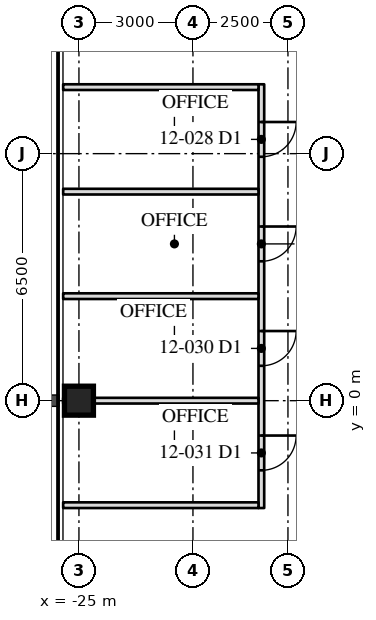
"""IFC4 building model, lengths in metres.
Left out: names, types, materials, properties, quantities, classifications, styles, units other than length and angle.
Written with IfcOpenShell. Run it as: python <this file> out.ifc"""

import sys

from ifc_helpers import new_model, si_unit, direction, frame, frame_2d, origin, origin_2d, place, context, subcontext, project, spatial, rectangle, hollow_rectangle, extrude, element, fill, save


model = new_model("IFC4")
c1 = context("Model", 3, precision=1e-05, world=origin(), true_north=direction((0.0, 1.0)))
c2 = subcontext(c1, "Body", "Model", "MODEL_VIEW")
j1 = project(units=[si_unit("LENGTHUNIT", "METRE"), si_unit("PLANEANGLEUNIT", "RADIAN")], contexts=[c1])
p1 = place(None, origin())
s1 = spatial("IfcSite", under=j1, at=p1, CompositionType="ELEMENT")
p2 = place(p1, origin())
s2 = spatial("IfcBuilding", under=s1, at=p2, CompositionType="ELEMENT")
p3 = place(p2, frame((0.0, 0.0, 52.9)))
s3 = spatial("IfcBuildingStorey", under=s2, at=p3, CompositionType="ELEMENT", Elevation=52.9)
p4 = place(p3, frame((-25.0, 0.0, 0.0), z_axis=(0.0, 0.0, 1.0), x_axis=(0.0, 1.0, 0.0)))
e1 = element("IfcColumn", 1, at=p4, inside=s3, PredefinedType="COLUMN", context=c2, shape_type="SweptSolid", body=[
    extrude(hollow_rectangle(XDim=0.762, YDim=0.762, WallThickness=0.127, at=origin_2d()), origin(), (0.0, 0.0, 1.0), 4.1),
])
p5 = place(p3, frame((-20.2, 8.325, 0.0), z_axis=(0.0, 0.0, 1.0), x_axis=(0.0, -1.0, 0.0)))
e2 = element("IfcWall", 2, at=p5, inside=s3, PredefinedType="PARTITIONING", context=c2, shape_type="SweptSolid", body=[
    extrude(rectangle(XDim=11.15, YDim=0.15, at=frame_2d((5.575, 0.0))), origin(), (0.0, 0.0, 1.0), 3.91),
])
p6 = place(p5, frame((0.992, 0.0, 0.0)))
e3 = element("IfcOpeningElement", 3, at=p6, cuts=e2, PredefinedType="OPENING", context=c2, shape_type="SweptSolid", body=[
    extrude(rectangle(XDim=0.915, YDim=2.134, at=frame_2d((0.458, 1.067))), frame((0.0, 0.085, 0.0), z_axis=(0.0, -1.0, 0.0), x_axis=(1.0, 0.0, 0.0)), (0.0, 0.0, 1.0), 0.17),
])
p7 = place(p5, frame((3.742, 0.0, 0.0)))
e4 = element("IfcOpeningElement", 4, at=p7, cuts=e2, PredefinedType="OPENING", context=c2, shape_type="SweptSolid", body=[
    extrude(rectangle(XDim=0.915, YDim=2.134, at=frame_2d((0.458, 1.067))), frame((0.0, 0.085, 0.0), z_axis=(0.0, -1.0, 0.0), x_axis=(1.0, 0.0, 0.0)), (0.0, 0.0, 1.0), 0.17),
])
p8 = place(p5, frame((6.492, 0.0, 0.0)))
e5 = element("IfcOpeningElement", 5, at=p8, cuts=e2, PredefinedType="OPENING", context=c2, shape_type="SweptSolid", body=[
    extrude(rectangle(XDim=0.915, YDim=2.134, at=frame_2d((0.458, 1.067))), frame((0.0, 0.085, 0.0), z_axis=(0.0, -1.0, 0.0), x_axis=(1.0, 0.0, 0.0)), (0.0, 0.0, 1.0), 0.17),
])
p9 = place(p5, frame((9.242, 0.0, 0.0)))
e6 = element("IfcOpeningElement", 6, at=p9, cuts=e2, PredefinedType="OPENING", context=c2, shape_type="SweptSolid", body=[
    extrude(rectangle(XDim=0.915, YDim=2.134, at=frame_2d((0.458, 1.067))), frame((0.0, 0.085, 0.0), z_axis=(0.0, -1.0, 0.0), x_axis=(1.0, 0.0, 0.0)), (0.0, 0.0, 1.0), 0.17),
])
for number, where, z_axis, x_axis in (
    (7, (-20.275, 8.25, 0.0), (0.0, 0.0, 1.0), (-1.0, 0.0, 0.0)),
    (8, (-20.275, 5.5, 0.0), (0.0, 0.0, 1.0), (-1.0, 0.0, 0.0)),
    (9, (-20.275, 2.75, 0.0), (0.0, 0.0, 1.0), (-1.0, 0.0, 0.0)),
):
    element("IfcWall", number, at=place(p3, frame(where, z_axis=z_axis, x_axis=x_axis)), inside=s3, PredefinedType="PARTITIONING", context=c2, shape_type="SweptSolid", body=[
        extrude(rectangle(XDim=5.14, YDim=0.15, at=frame_2d((2.57, 0.0))), origin(), (0.0, 0.0, 1.0), 3.91),
    ])
p10 = place(p3, frame((-20.275, 0.0, 0.0), z_axis=(0.0, 0.0, 1.0), x_axis=(-1.0, 0.0, 0.0)))
e10 = element("IfcWall", 10, at=p10, inside=s3, PredefinedType="PARTITIONING", context=c2, shape_type="SweptSolid", body=[
    extrude(rectangle(XDim=5.14, YDim=0.15, at=frame_2d((2.57, 0.0))), origin(), (0.0, 0.0, 1.0), 3.13),
])
p11 = place(p3, frame((-20.275, -2.75, 0.0), z_axis=(0.0, 0.0, 1.0), x_axis=(-1.0, 0.0, 0.0)))
e11 = element("IfcWall", 11, at=p11, inside=s3, PredefinedType="PARTITIONING", context=c2, shape_type="SweptSolid", body=[
    extrude(rectangle(XDim=5.14, YDim=0.15, at=frame_2d((2.57, 0.0))), origin(), (0.0, 0.0, 1.0), 3.91),
])
p12 = place(p6, origin())
e12 = element("IfcDoor", 12, at=p12, inside=s3, OperationType="SINGLE_SWING_LEFT", PredefinedType="DOOR", context=c2, shape_type="SweptSolid", body=[
    extrude(rectangle(XDim=0.915, YDim=2.134, at=frame_2d((0.458, 1.067))), frame((0.0, 0.025, 0.0), z_axis=(0.0, -1.0, 0.0), x_axis=(1.0, 0.0, 0.0)), (0.0, 0.0, 1.0), 0.05),
])
fill(e3, e12)
p13 = place(p7, origin())
e13 = element("IfcDoor", 13, at=p13, inside=s3, OperationType="SINGLE_SWING_LEFT", PredefinedType="DOOR", context=c2, shape_type="SweptSolid", body=[
    extrude(rectangle(XDim=0.915, YDim=2.134, at=frame_2d((0.458, 1.067))), frame((0.0, 0.025, 0.0), z_axis=(0.0, -1.0, 0.0), x_axis=(1.0, 0.0, 0.0)), (0.0, 0.0, 1.0), 0.05),
])
fill(e4, e13)
p14 = place(p8, origin())
e14 = element("IfcDoor", 14, at=p14, inside=s3, OperationType="SINGLE_SWING_LEFT", PredefinedType="DOOR", context=c2, shape_type="SweptSolid", body=[
    extrude(rectangle(XDim=0.915, YDim=2.134, at=frame_2d((0.458, 1.067))), frame((0.0, 0.025, 0.0), z_axis=(0.0, -1.0, 0.0), x_axis=(1.0, 0.0, 0.0)), (0.0, 0.0, 1.0), 0.05),
])
fill(e5, e14)
p15 = place(p9, origin())
e15 = element("IfcDoor", 15, at=p15, inside=s3, OperationType="SINGLE_SWING_LEFT", PredefinedType="DOOR", context=c2, shape_type="SweptSolid", body=[
    extrude(rectangle(XDim=0.915, YDim=2.134, at=frame_2d((0.458, 1.067))), frame((0.0, 0.025, 0.0), z_axis=(0.0, -1.0, 0.0), x_axis=(1.0, 0.0, 0.0)), (0.0, 0.0, 1.0), 0.05),
])
fill(e6, e15)
save(model, sys.argv[1])
